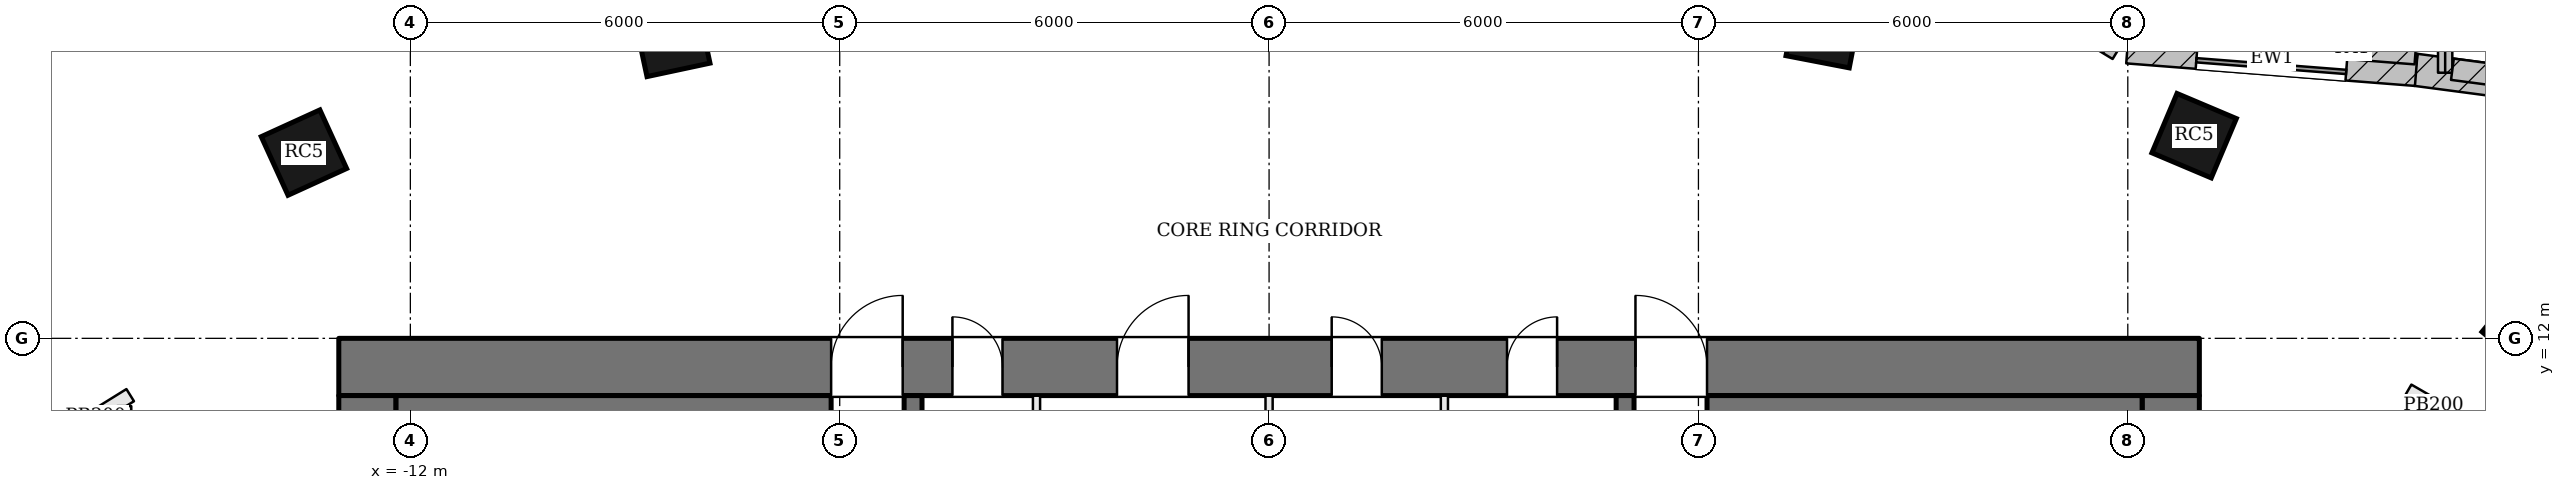
"""IFC4 building model, lengths in metres.
Left out: names, types, materials, properties, quantities, classifications, styles, units other than length and angle.
Written with IfcOpenShell. Run it as: python <this file> out.ifc"""

import sys

from ifc_helpers import new_model, si_unit, direction, frame, frame_2d, origin, origin_2d, place, context, subcontext, project, spatial, rectangle, extrude, element, fill, save


model = new_model("IFC4")
c1 = context("Model", 3, precision=1e-05, world=origin(), true_north=direction((0.0, 1.0)))
c2 = subcontext(c1, "Body", "Model", "MODEL_VIEW")
j1 = project(units=[si_unit("LENGTHUNIT", "METRE"), si_unit("PLANEANGLEUNIT", "RADIAN")], contexts=[c1])
p1 = place(None, origin())
s1 = spatial("IfcSite", under=j1, at=p1, CompositionType="ELEMENT")
p2 = place(p1, origin())
s2 = spatial("IfcBuilding", under=s1, at=p2, CompositionType="ELEMENT")
p3 = place(p2, frame((0.0, 0.0, 280.5)))
s3 = spatial("IfcBuildingStorey", under=s2, at=p3, CompositionType="ELEMENT", Elevation=280.5)
p4 = place(p3, frame((-13.0, 11.6, 0.0), z_axis=(0.0, 0.0, 1.0), x_axis=(1.0, 0.0, 0.0)))
e1 = element("IfcWall", 1, at=p4, inside=s3, PredefinedType="SHEAR", context=c2, shape_type="SweptSolid", body=[
    extrude(rectangle(XDim=26.0, YDim=0.8, at=frame_2d((13.0, 0.0))), origin(), (0.0, 0.0, 1.0), 3.9),
])
p5 = place(p4, frame((8.575, 0.0, 0.0)))
e2 = element("IfcOpeningElement", 2, at=p5, cuts=e1, PredefinedType="OPENING", context=c2, shape_type="SweptSolid", body=[
    extrude(rectangle(XDim=0.7, YDim=2.1, at=frame_2d((0.35, 1.05))), frame((0.0, 0.41, 0.0), z_axis=(0.0, -1.0, 0.0), x_axis=(1.0, 0.0, 0.0)), (0.0, 0.0, 1.0), 0.82),
])
p6 = place(p4, frame((10.875, 0.0, 0.0)))
e3 = element("IfcOpeningElement", 3, at=p6, cuts=e1, PredefinedType="OPENING", context=c2, shape_type="SweptSolid", body=[
    extrude(rectangle(XDim=1.0, YDim=2.1, at=frame_2d((0.5, 1.05))), frame((0.0, 0.41, 0.0), z_axis=(0.0, -1.0, 0.0), x_axis=(1.0, 0.0, 0.0)), (0.0, 0.0, 1.0), 0.82),
])
p7 = place(p4, frame((13.875, 0.0, 0.0)))
e4 = element("IfcOpeningElement", 4, at=p7, cuts=e1, PredefinedType="OPENING", context=c2, shape_type="SweptSolid", body=[
    extrude(rectangle(XDim=0.7, YDim=2.1, at=frame_2d((0.35, 1.05))), frame((0.0, 0.41, 0.0), z_axis=(0.0, -1.0, 0.0), x_axis=(1.0, 0.0, 0.0)), (0.0, 0.0, 1.0), 0.82),
])
p8 = place(p4, frame((16.325, 0.0, 0.0)))
e5 = element("IfcOpeningElement", 5, at=p8, cuts=e1, PredefinedType="OPENING", context=c2, shape_type="SweptSolid", body=[
    extrude(rectangle(XDim=0.7, YDim=2.1, at=frame_2d((0.35, 1.05))), frame((0.0, 0.41, 0.0), z_axis=(0.0, -1.0, 0.0), x_axis=(1.0, 0.0, 0.0)), (0.0, 0.0, 1.0), 0.82),
])
p9 = place(p4, frame((6.88, 0.0, 0.0)))
e6 = element("IfcOpeningElement", 6, at=p9, cuts=e1, PredefinedType="OPENING", context=c2, shape_type="SweptSolid", body=[
    extrude(rectangle(XDim=1.0, YDim=2.1, at=frame_2d((0.5, 1.05))), frame((0.0, 0.41, 0.0), z_axis=(0.0, -1.0, 0.0), x_axis=(1.0, 0.0, 0.0)), (0.0, 0.0, 1.0), 0.82),
])
p10 = place(p4, frame((18.12, 0.0, 0.0)))
e7 = element("IfcOpeningElement", 7, at=p10, cuts=e1, PredefinedType="OPENING", context=c2, shape_type="SweptSolid", body=[
    extrude(rectangle(XDim=1.0, YDim=2.1, at=frame_2d((0.5, 1.05))), frame((0.0, 0.41, 0.0), z_axis=(0.0, -1.0, 0.0), x_axis=(1.0, 0.0, 0.0)), (0.0, 0.0, 1.0), 0.82),
])
p11 = place(p3, frame((12.6, -2.2, 0.0), z_axis=(0.0, 0.0, 1.0), x_axis=(0.0, 1.0, 0.0)))
e8 = element("IfcWall", 8, at=p11, inside=s3, PredefinedType="SHEAR", context=c2, shape_type="SweptSolid", body=[
    extrude(rectangle(XDim=13.4, YDim=0.8, at=frame_2d((6.7, 0.0))), origin(), (0.0, 0.0, 1.0), 3.9),
])
p12 = place(p11, frame((7.4, 0.0, 0.0)))
e9 = element("IfcOpeningElement", 9, at=p12, cuts=e8, PredefinedType="OPENING", context=c2, shape_type="SweptSolid", body=[
    extrude(rectangle(XDim=1.8, YDim=2.1, at=frame_2d((0.9, 1.05))), frame((0.0, 0.41, 0.0), z_axis=(0.0, -1.0, 0.0), x_axis=(1.0, 0.0, 0.0)), (0.0, 0.0, 1.0), 0.82),
])
p13 = place(p3, frame((-12.6, -2.2, 0.0), z_axis=(0.0, 0.0, 1.0), x_axis=(0.0, 1.0, 0.0)))
e10 = element("IfcWall", 10, at=p13, inside=s3, PredefinedType="SHEAR", context=c2, shape_type="SweptSolid", body=[
    extrude(rectangle(XDim=13.4, YDim=0.8, at=frame_2d((6.7, 0.0))), origin(), (0.0, 0.0, 1.0), 3.9),
])
p14 = place(p13, frame((4.2, 0.0, 0.0)))
e11 = element("IfcOpeningElement", 11, at=p14, cuts=e10, PredefinedType="OPENING", context=c2, shape_type="SweptSolid", body=[
    extrude(rectangle(XDim=1.8, YDim=2.1, at=frame_2d((0.9, 1.05))), frame((0.0, 0.41, 0.0), z_axis=(0.0, -1.0, 0.0), x_axis=(1.0, 0.0, 0.0)), (0.0, 0.0, 1.0), 0.82),
])
for number, where, z_axis, x_axis in (
    (12, (17.584, 12.151, 0.0), (0.0, 0.0, 1.0), (-0.771, 0.637, 0.0)),
    (13, (12.927, 14.832, 0.0), (0.0, 0.0, 1.0), (-0.921, 0.389, 0.0)),
    (14, (7.751, 16.307, 0.0), (0.0, 0.0, 1.0), (-0.982, 0.189, 0.0)),
    (15, (-8.347, 16.192, 0.0), (0.0, 0.0, 1.0), (-0.978, -0.209, 0.0)),
    (16, (-13.487, 14.596, 0.0), (0.0, 0.0, 1.0), (-0.91, -0.415, 0.0)),
):
    element("IfcColumn", number, at=place(p3, frame(where, z_axis=z_axis, x_axis=x_axis)), inside=s3, PredefinedType="COLUMN", context=c2, shape_type="SweptSolid", body=[
        extrude(rectangle(XDim=0.9, YDim=0.9, at=origin_2d()), origin(), (0.0, 0.0, 1.0), 3.9),
    ])
p15 = place(p3, frame((21.044, 15.091, 0.0), z_axis=(0.0, 0.0, 1.0), x_axis=(-0.991409967396, 0.130790965086, 0.0)))
e17 = element("IfcWall", 17, at=p15, inside=s3, PredefinedType="SOLIDWALL", context=c2, shape_type="SweptSolid", body=[
    extrude(rectangle(XDim=5.068, YDim=0.45, at=frame_2d((2.534, 0.0))), origin(), (0.0, 0.0, 1.0), 3.7),
])
p16 = place(p15, frame((1.484, 0.0, 0.9)))
e18 = element("IfcOpeningElement", 18, at=p16, cuts=e17, PredefinedType="OPENING", context=c2, shape_type="SweptSolid", body=[
    extrude(rectangle(XDim=2.1, YDim=2.3, at=frame_2d((1.05, 1.15))), frame((0.0, 0.235, 0.0), z_axis=(0.0, -1.0, 0.0), x_axis=(1.0, 0.0, 0.0)), (0.0, 0.0, 1.0), 0.47),
])
p17 = place(p3, frame((16.03, 15.752, 0.0), z_axis=(0.0, 0.0, 1.0), x_axis=(-0.996967628157, 0.077817404267, 0.0)))
e19 = element("IfcWall", 19, at=p17, inside=s3, PredefinedType="SOLIDWALL", context=c2, shape_type="SweptSolid", body=[
    extrude(rectangle(XDim=4.047, YDim=0.45, at=frame_2d((2.023, 0.0))), origin(), (0.0, 0.0, 1.0), 3.7),
])
p18 = place(p17, frame((0.974, 0.0, 0.9)))
e20 = element("IfcOpeningElement", 20, at=p18, cuts=e19, PredefinedType="OPENING", context=c2, shape_type="SweptSolid", body=[
    extrude(rectangle(XDim=2.1, YDim=2.3, at=frame_2d((1.05, 1.15))), frame((0.0, 0.235, 0.0), z_axis=(0.0, -1.0, 0.0), x_axis=(1.0, 0.0, 0.0)), (0.0, 0.0, 1.0), 0.47),
])
p19 = place(p3, frame((11.905, 16.096, 0.0), z_axis=(0.0, 0.0, 1.0), x_axis=(-0.854609476155, 0.519271261738, 0.0)))
e21 = element("IfcWall", 21, at=p19, inside=s3, PredefinedType="SOLIDWALL", context=c2, shape_type="SweptSolid", body=[
    extrude(rectangle(XDim=3.325, YDim=0.45, at=frame_2d((1.663, 0.0))), origin(), (0.0, 0.0, 1.0), 3.7),
])
p20 = place(p19, frame((0.612, 0.0, 0.9)))
e22 = element("IfcOpeningElement", 22, at=p20, cuts=e21, PredefinedType="OPENING", context=c2, shape_type="SweptSolid", body=[
    extrude(rectangle(XDim=2.1, YDim=2.3, at=frame_2d((1.05, 1.15))), frame((0.0, 0.235, 0.0), z_axis=(0.0, -1.0, 0.0), x_axis=(1.0, 0.0, 0.0)), (0.0, 0.0, 1.0), 0.47),
])
p21 = place(p3, frame((16.435, 15.712, 0.0), z_axis=(0.0, 0.0, 1.0), x_axis=(-0.000279017846, 0.999999961075, 0.0)))
e23 = element("IfcWall", 23, at=p21, inside=s3, PredefinedType="SOLIDWALL", context=c2, shape_type="SweptSolid", body=[
    extrude(rectangle(XDim=1.75, YDim=0.2, at=frame_2d((0.875, 0.0))), origin(), (0.0, 0.0, 1.0), 3.7),
])
p22 = place(p3, frame((20.923, 15.182, 3.9), z_axis=(0.0, 0.0, 1.0), x_axis=(-0.991411041714, 0.130782821377, 0.0)))
e24 = element("IfcWall", 24, at=p22, inside=s3, PredefinedType="PARAPET", context=c2, shape_type="SweptSolid", body=[
    extrude(rectangle(XDim=4.424, YDim=0.3, at=frame_2d((2.212, 0.0))), origin(), (0.0, 0.0, 1.0), 1.1),
])
p23 = place(p3, frame((16.019, 15.979, 3.9), z_axis=(0.0, 0.0, 1.0), x_axis=(-0.99696580474, 0.077840761676, 0.0)))
e25 = element("IfcWall", 25, at=p23, inside=s3, PredefinedType="PARAPET", context=c2, shape_type="SweptSolid", body=[
    extrude(rectangle(XDim=1.778, YDim=0.3, at=frame_2d((0.889, 0.0))), origin(), (0.0, 0.0, 1.0), 1.1),
])
p24 = place(p3, frame((-4.975, -2.2, 0.0), z_axis=(0.0, 0.0, 1.0), x_axis=(0.0, 1.0, 0.0)))
e26 = element("IfcWall", 26, at=p24, inside=s3, PredefinedType="SOLIDWALL", context=c2, shape_type="SweptSolid", body=[
    extrude(rectangle(XDim=13.4, YDim=0.25, at=frame_2d((6.7, 0.0))), origin(), (0.0, 0.0, 1.0), 3.7),
])
p25 = place(p24, frame((5.25, 0.0, 0.0)))
e27 = element("IfcOpeningElement", 27, at=p25, cuts=e26, PredefinedType="OPENING", context=c2, shape_type="SweptSolid", body=[
    extrude(rectangle(XDim=1.2, YDim=2.1, at=frame_2d((0.6, 1.05))), frame((0.0, 0.135, 0.0), z_axis=(0.0, -1.0, 0.0), x_axis=(1.0, 0.0, 0.0)), (0.0, 0.0, 1.0), 0.27),
])
p26 = place(p3, frame((4.975, 11.2, 0.0), z_axis=(0.0, 0.0, 1.0), x_axis=(0.0, -1.0, 0.0)))
e28 = element("IfcWall", 28, at=p26, inside=s3, PredefinedType="SOLIDWALL", context=c2, shape_type="SweptSolid", body=[
    extrude(rectangle(XDim=13.4, YDim=0.25, at=frame_2d((6.7, 0.0))), origin(), (0.0, 0.0, 1.0), 3.7),
])
p27 = place(p26, frame((5.25, 0.0, 0.0)))
e29 = element("IfcOpeningElement", 29, at=p27, cuts=e28, PredefinedType="OPENING", context=c2, shape_type="SweptSolid", body=[
    extrude(rectangle(XDim=1.2, YDim=2.1, at=frame_2d((0.6, 1.05))), frame((0.0, 0.135, 0.0), z_axis=(0.0, -1.0, 0.0), x_axis=(1.0, 0.0, 0.0)), (0.0, 0.0, 1.0), 0.27),
])
for number, where, z_axis, x_axis in (
    (30, (-12.2, 10.9, 0.0), (0.0, 0.0, 1.0), (1.0, 0.0, 0.0)),
    (31, (12.2, 10.9, 0.0), (0.0, 0.0, 1.0), (-1.0, 0.0, 0.0)),
):
    element("IfcWall", number, at=place(p3, frame(where, z_axis=z_axis, x_axis=x_axis)), inside=s3, PredefinedType="SOLIDWALL", context=c2, shape_type="SweptSolid", body=[
        extrude(rectangle(XDim=6.08, YDim=0.6, at=frame_2d((3.04, 0.0))), origin(), (0.0, 0.0, 1.0), 3.7),
    ])
for number, where, z_axis, x_axis in (
    (32, (-3.25, 8.6, 0.0), (0.0, 0.0, 1.0), (0.0, 1.0, 0.0)),
    (33, (0.0, 8.6, 0.0), (0.0, 0.0, 1.0), (0.0, 1.0, 0.0)),
    (34, (2.45, 8.6, 0.0), (0.0, 0.0, 1.0), (0.0, 1.0, 0.0)),
):
    element("IfcWall", number, at=place(p3, frame(where, z_axis=z_axis, x_axis=x_axis)), inside=s3, PredefinedType="PARTITIONING", context=c2, shape_type="SweptSolid", body=[
        extrude(rectangle(XDim=2.6, YDim=0.1, at=frame_2d((1.3, 0.0))), origin(), (0.0, 0.0, 1.0), 3.7),
    ])
p28 = place(p3, frame((-16.883, 10.605, 0.0), z_axis=(0.0, 0.0, 1.0), x_axis=(0.84954745962, 0.527512193085, 0.0)))
e35 = element("IfcWall", 35, at=p28, inside=s3, PredefinedType="PARTITIONING", context=c2, shape_type="SweptSolid", body=[
    extrude(rectangle(XDim=1.139, YDim=0.2, at=frame_2d((0.57, 0.0))), origin(), (0.0, 0.0, 1.0), 3.7),
])
p29 = place(p3, frame((-16.0, 11.053, 0.0), z_axis=(0.0, 0.0, 1.0), x_axis=(0.0, -1.0, 0.0)))
e36 = element("IfcWall", 36, at=p29, inside=s3, PredefinedType="PARTITIONING", context=c2, shape_type="SweptSolid", body=[
    extrude(rectangle(XDim=16.953, YDim=0.2, at=frame_2d((8.477, 0.0))), origin(), (0.0, 0.0, 1.0), 3.7),
])
p30 = place(p29, frame((6.077, 0.0, 0.0)))
e37 = element("IfcOpeningElement", 37, at=p30, cuts=e36, PredefinedType="OPENING", context=c2, shape_type="SweptSolid", body=[
    extrude(rectangle(XDim=1.8, YDim=2.1, at=frame_2d((0.9, 1.05))), frame((0.0, 0.11, 0.0), z_axis=(0.0, -1.0, 0.0), x_axis=(1.0, 0.0, 0.0)), (0.0, 0.0, 1.0), 0.22),
])
p31 = place(p3, frame((15.913, 11.267, 0.0), z_axis=(0.0, 0.0, 1.0), x_axis=(0.866219676164, -0.4996633593, 0.0)))
e38 = element("IfcWall", 38, at=p31, inside=s3, PredefinedType="PARTITIONING", context=c2, shape_type="SweptSolid", body=[
    extrude(rectangle(XDim=0.834, YDim=0.2, at=frame_2d((0.417, 0.0))), origin(), (0.0, 0.0, 1.0), 3.7),
])
p32 = place(p3, frame((16.0, -5.9, 0.0), z_axis=(0.0, 0.0, 1.0), x_axis=(0.0, 1.0, 0.0)))
e39 = element("IfcWall", 39, at=p32, inside=s3, PredefinedType="PARTITIONING", context=c2, shape_type="SweptSolid", body=[
    extrude(rectangle(XDim=17.017, YDim=0.2, at=frame_2d((8.508, 0.0))), origin(), (0.0, 0.0, 1.0), 3.7),
])
p33 = place(p32, frame((9.108, 0.0, 0.0)))
e40 = element("IfcOpeningElement", 40, at=p33, cuts=e39, PredefinedType="OPENING", context=c2, shape_type="SweptSolid", body=[
    extrude(rectangle(XDim=1.8, YDim=2.1, at=frame_2d((0.9, 1.05))), frame((0.0, 0.11, 0.0), z_axis=(0.0, -1.0, 0.0), x_axis=(1.0, 0.0, 0.0)), (0.0, 0.0, 1.0), 0.22),
])
p34 = place(p18, origin())
e41 = element("IfcWindow", 41, at=p34, inside=s3, PartitioningType="SINGLE_PANEL", PredefinedType="WINDOW", context=c2, shape_type="SweptSolid", body=[
    extrude(rectangle(XDim=2.1, YDim=2.3, at=frame_2d((1.05, 1.15))), frame((0.0, 0.135, 0.0), z_axis=(0.0, -1.0, 0.0), x_axis=(1.0, 0.0, 0.0)), (0.0, 0.0, 1.0), 0.06),
])
fill(e20, e41)
p35 = place(p5, origin())
e42 = element("IfcDoor", 42, at=p35, inside=s3, OperationType="SINGLE_SWING_LEFT", PredefinedType="DOOR", context=c2, shape_type="SweptSolid", body=[
    extrude(rectangle(XDim=0.7, YDim=2.1, at=frame_2d((0.35, 1.05))), frame((0.0, 0.025, 0.0), z_axis=(0.0, -1.0, 0.0), x_axis=(1.0, 0.0, 0.0)), (0.0, 0.0, 1.0), 0.05),
])
fill(e2, e42)
p36 = place(p6, origin())
e43 = element("IfcDoor", 43, at=p36, inside=s3, OperationType="SINGLE_SWING_RIGHT", PredefinedType="DOOR", context=c2, shape_type="SweptSolid", body=[
    extrude(rectangle(XDim=1.0, YDim=2.1, at=frame_2d((0.5, 1.05))), frame((0.0, 0.025, 0.0), z_axis=(0.0, -1.0, 0.0), x_axis=(1.0, 0.0, 0.0)), (0.0, 0.0, 1.0), 0.05),
])
fill(e3, e43)
p37 = place(p7, origin())
e44 = element("IfcDoor", 44, at=p37, inside=s3, OperationType="SINGLE_SWING_LEFT", PredefinedType="DOOR", context=c2, shape_type="SweptSolid", body=[
    extrude(rectangle(XDim=0.7, YDim=2.1, at=frame_2d((0.35, 1.05))), frame((0.0, 0.025, 0.0), z_axis=(0.0, -1.0, 0.0), x_axis=(1.0, 0.0, 0.0)), (0.0, 0.0, 1.0), 0.05),
])
fill(e4, e44)
p38 = place(p8, origin())
e45 = element("IfcDoor", 45, at=p38, inside=s3, OperationType="SINGLE_SWING_RIGHT", PredefinedType="DOOR", context=c2, shape_type="SweptSolid", body=[
    extrude(rectangle(XDim=0.7, YDim=2.1, at=frame_2d((0.35, 1.05))), frame((0.0, 0.025, 0.0), z_axis=(0.0, -1.0, 0.0), x_axis=(1.0, 0.0, 0.0)), (0.0, 0.0, 1.0), 0.05),
])
fill(e5, e45)
p39 = place(p9, origin())
e46 = element("IfcDoor", 46, at=p39, inside=s3, OperationType="SINGLE_SWING_RIGHT", PredefinedType="DOOR", context=c2, shape_type="SweptSolid", body=[
    extrude(rectangle(XDim=1.0, YDim=2.1, at=frame_2d((0.5, 1.05))), frame((0.0, 0.025, 0.0), z_axis=(0.0, -1.0, 0.0), x_axis=(1.0, 0.0, 0.0)), (0.0, 0.0, 1.0), 0.05),
])
fill(e6, e46)
p40 = place(p10, origin())
e47 = element("IfcDoor", 47, at=p40, inside=s3, OperationType="SINGLE_SWING_LEFT", PredefinedType="DOOR", context=c2, shape_type="SweptSolid", body=[
    extrude(rectangle(XDim=1.0, YDim=2.1, at=frame_2d((0.5, 1.05))), frame((0.0, 0.025, 0.0), z_axis=(0.0, -1.0, 0.0), x_axis=(1.0, 0.0, 0.0)), (0.0, 0.0, 1.0), 0.05),
])
fill(e7, e47)
save(model, sys.argv[1])
